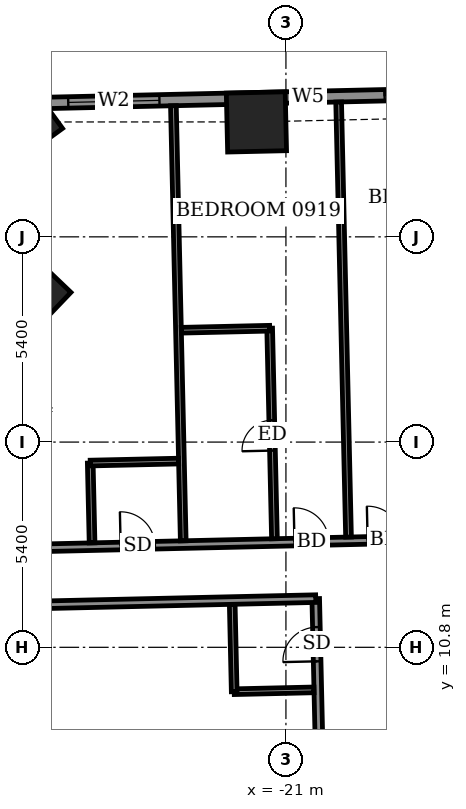
"""IFC4 building model, lengths in metres.
Left out: names, types, materials, properties, quantities, classifications, styles, units other than length and angle.
Written with IfcOpenShell. Run it as: python <this file> out.ifc"""

import sys

from ifc_helpers import new_model, si_unit, direction, frame, frame_2d, origin, origin_2d, place, context, subcontext, project, spatial, rectangle, extrude, element, fill, save


model = new_model("IFC4")
c1 = context("Model", 3, precision=1e-05, world=origin(), true_north=direction((0.0, 1.0)))
c2 = subcontext(c1, "Body", "Model", "MODEL_VIEW")
j1 = project(units=[si_unit("LENGTHUNIT", "METRE"), si_unit("PLANEANGLEUNIT", "RADIAN")], contexts=[c1])
p1 = place(None, origin())
s1 = spatial("IfcSite", under=j1, at=p1, CompositionType="ELEMENT")
p2 = place(p1, origin())
s2 = spatial("IfcBuilding", under=s1, at=p2, CompositionType="ELEMENT")
p3 = place(p2, frame((0.0, 0.0, 41.3)))
s3 = spatial("IfcBuildingStorey", under=s2, at=p3, CompositionType="ELEMENT", Elevation=41.3)
for number, where, z_axis, x_axis in (
    (1, (-21.776, 24.624, -0.55), (0.0, 0.0, 1.0), (-1.0, -0.023, 0.0)),
    (2, (-27.961, 24.623, -0.55), (0.0, 0.0, 1.0), (-0.808, -0.589, 0.0)),
    (3, (-27.753, 20.115, -0.55), (0.0, 0.0, 1.0), (-0.691, -0.723, 0.0)),
):
    element("IfcColumn", number, at=place(p3, frame(where, z_axis=z_axis, x_axis=x_axis)), inside=s3, PredefinedType="COLUMN", context=c2, shape_type="SweptSolid", body=[
        extrude(rectangle(XDim=1.55, YDim=1.55, at=origin_2d()), origin(), (0.0, 0.0, 1.0), 3.6),
    ])
p4 = place(p3, frame((24.423, 26.298, 0.0), z_axis=(0.0, 0.0, 1.0), x_axis=(-0.999742433108, -0.022695097355, 0.0)))
e4 = element("IfcWall", 4, at=p4, inside=s3, PredefinedType="SOLIDWALL", context=c2, shape_type="SweptSolid", body=[
    extrude(rectangle(XDim=52.701, YDim=0.3, at=frame_2d((26.35, 0.0))), origin(), (0.0, 0.0, 1.0), 3.05),
])
p5 = place(p4, frame((2.357, 0.0, 0.0)))
e5 = element("IfcOpeningElement", 5, at=p5, cuts=e4, PredefinedType="OPENING", context=c2, shape_type="SweptSolid", body=[
    extrude(rectangle(XDim=1.5, YDim=2.4, at=frame_2d((0.75, 1.2))), frame((0.0, 0.16, 0.0), z_axis=(0.0, -1.0, 0.0), x_axis=(1.0, 0.0, 0.0)), (0.0, 0.0, 1.0), 0.32),
])
p6 = place(p4, frame((7.475, 0.0, 0.0)))
e6 = element("IfcOpeningElement", 6, at=p6, cuts=e4, PredefinedType="OPENING", context=c2, shape_type="SweptSolid", body=[
    extrude(rectangle(XDim=1.5, YDim=2.4, at=frame_2d((0.75, 1.2))), frame((0.0, 0.16, 0.0), z_axis=(0.0, -1.0, 0.0), x_axis=(1.0, 0.0, 0.0)), (0.0, 0.0, 1.0), 0.32),
])
p7 = place(p4, frame((10.262, 0.0, 0.0)))
e7 = element("IfcOpeningElement", 7, at=p7, cuts=e4, PredefinedType="OPENING", context=c2, shape_type="SweptSolid", body=[
    extrude(rectangle(XDim=1.5, YDim=2.4, at=frame_2d((0.75, 1.2))), frame((0.0, 0.16, 0.0), z_axis=(0.0, -1.0, 0.0), x_axis=(1.0, 0.0, 0.0)), (0.0, 0.0, 1.0), 0.32),
])
p8 = place(p4, frame((15.1, 0.0, 0.0)))
e8 = element("IfcOpeningElement", 8, at=p8, cuts=e4, PredefinedType="OPENING", context=c2, shape_type="SweptSolid", body=[
    extrude(rectangle(XDim=1.5, YDim=2.4, at=frame_2d((0.75, 1.2))), frame((0.0, 0.16, 0.0), z_axis=(0.0, -1.0, 0.0), x_axis=(1.0, 0.0, 0.0)), (0.0, 0.0, 1.0), 0.32),
])
p9 = place(p4, frame((20.7, 0.0, 0.0)))
e9 = element("IfcOpeningElement", 9, at=p9, cuts=e4, PredefinedType="OPENING", context=c2, shape_type="SweptSolid", body=[
    extrude(rectangle(XDim=1.2, YDim=2.4, at=frame_2d((0.6, 1.2))), frame((0.0, 0.16, 0.0), z_axis=(0.0, -1.0, 0.0), x_axis=(1.0, 0.0, 0.0)), (0.0, 0.0, 1.0), 0.32),
])
p10 = place(p4, frame((23.337, 0.0, 0.0)))
e10 = element("IfcOpeningElement", 10, at=p10, cuts=e4, PredefinedType="OPENING", context=c2, shape_type="SweptSolid", body=[
    extrude(rectangle(XDim=1.5, YDim=2.4, at=frame_2d((0.75, 1.2))), frame((0.0, 0.16, 0.0), z_axis=(0.0, -1.0, 0.0), x_axis=(1.0, 0.0, 0.0)), (0.0, 0.0, 1.0), 0.32),
])
p11 = place(p4, frame((28.238, 0.0, 0.0)))
e11 = element("IfcOpeningElement", 11, at=p11, cuts=e4, PredefinedType="OPENING", context=c2, shape_type="SweptSolid", body=[
    extrude(rectangle(XDim=1.5, YDim=2.4, at=frame_2d((0.75, 1.2))), frame((0.0, 0.16, 0.0), z_axis=(0.0, -1.0, 0.0), x_axis=(1.0, 0.0, 0.0)), (0.0, 0.0, 1.0), 0.32),
])
p12 = place(p4, frame((33.9, 0.0, 0.0)))
e12 = element("IfcOpeningElement", 12, at=p12, cuts=e4, PredefinedType="OPENING", context=c2, shape_type="SweptSolid", body=[
    extrude(rectangle(XDim=1.2, YDim=2.4, at=frame_2d((0.6, 1.2))), frame((0.0, 0.16, 0.0), z_axis=(0.0, -1.0, 0.0), x_axis=(1.0, 0.0, 0.0)), (0.0, 0.0, 1.0), 0.32),
])
p13 = place(p4, frame((36.538, 0.0, 0.0)))
e13 = element("IfcOpeningElement", 13, at=p13, cuts=e4, PredefinedType="OPENING", context=c2, shape_type="SweptSolid", body=[
    extrude(rectangle(XDim=1.5, YDim=2.4, at=frame_2d((0.75, 1.2))), frame((0.0, 0.16, 0.0), z_axis=(0.0, -1.0, 0.0), x_axis=(1.0, 0.0, 0.0)), (0.0, 0.0, 1.0), 0.32),
])
p14 = place(p4, frame((41.338, 0.0, 0.0)))
e14 = element("IfcOpeningElement", 14, at=p14, cuts=e4, PredefinedType="OPENING", context=c2, shape_type="SweptSolid", body=[
    extrude(rectangle(XDim=1.5, YDim=2.4, at=frame_2d((0.75, 1.2))), frame((0.0, 0.16, 0.0), z_axis=(0.0, -1.0, 0.0), x_axis=(1.0, 0.0, 0.0)), (0.0, 0.0, 1.0), 0.32),
])
p15 = place(p4, frame((44.4, 0.0, 0.9)))
e15 = element("IfcOpeningElement", 15, at=p15, cuts=e4, PredefinedType="OPENING", context=c2, shape_type="SweptSolid", body=[
    extrude(rectangle(XDim=0.9, YDim=1.5, at=frame_2d((0.45, 0.75))), frame((0.0, 0.16, 0.0), z_axis=(0.0, -1.0, 0.0), x_axis=(1.0, 0.0, 0.0)), (0.0, 0.0, 1.0), 0.32),
])
p16 = place(p4, frame((48.764, 0.0, 0.9)))
e16 = element("IfcOpeningElement", 16, at=p16, cuts=e4, PredefinedType="OPENING", context=c2, shape_type="SweptSolid", body=[
    extrude(rectangle(XDim=2.4, YDim=1.5, at=frame_2d((1.2, 0.75))), frame((0.0, 0.16, 0.0), z_axis=(0.0, -1.0, 0.0), x_axis=(1.0, 0.0, 0.0)), (0.0, 0.0, 1.0), 0.32),
])
p17 = place(p3, frame((-22.248, 26.688, 0.0), z_axis=(0.0, 0.0, 1.0), x_axis=(0.999743178102, 0.022662255828, 0.0)))
e17 = element("IfcWall", 17, at=p17, inside=s3, PredefinedType="USERDEFINED", context=c2, shape_type="SweptSolid", body=[
    extrude(rectangle(XDim=6.0, YDim=0.55, at=frame_2d((3.0, 0.0))), origin(), (0.0, 0.0, 1.0), 0.8),
])
p18 = place(p3, frame((-19.589, -15.562, 0.0), z_axis=(0.0, 0.0, 1.0), x_axis=(-0.02267447203, 0.999742901109, 0.0)))
e18 = element("IfcWall", 18, at=p18, inside=s3, PredefinedType="PARTITIONING", context=c2, shape_type="SweptSolid", body=[
    extrude(rectangle(XDim=27.65, YDim=0.2, at=frame_2d((13.825, 0.0))), origin(), (0.0, 0.0, 1.0), 3.05),
])
p19 = place(p18, frame((22.313, 0.0, 0.0)))
e19 = element("IfcOpeningElement", 19, at=p19, cuts=e18, PredefinedType="OPENING", context=c2, shape_type="SweptSolid", body=[
    extrude(rectangle(XDim=1.0, YDim=2.1, at=frame_2d((0.5, 1.05))), frame((0.0, 0.11, 0.0), z_axis=(0.0, -1.0, 0.0), x_axis=(1.0, 0.0, 0.0)), (0.0, 0.0, 1.0), 0.22),
])
p20 = place(p18, frame((26.0, 0.0, 0.0)))
e20 = element("IfcOpeningElement", 20, at=p20, cuts=e18, PredefinedType="OPENING", context=c2, shape_type="SweptSolid", body=[
    extrude(rectangle(XDim=0.9, YDim=2.1, at=frame_2d((0.45, 1.05))), frame((0.0, 0.11, 0.0), z_axis=(0.0, -1.0, 0.0), x_axis=(1.0, 0.0, 0.0)), (0.0, 0.0, 1.0), 0.22),
])
p21 = place(p18, frame((17.843, 0.0, 0.0)))
e21 = element("IfcOpeningElement", 21, at=p21, cuts=e18, PredefinedType="OPENING", context=c2, shape_type="SweptSolid", body=[
    extrude(rectangle(XDim=1.0, YDim=2.1, at=frame_2d((0.5, 1.05))), frame((0.0, 0.11, 0.0), z_axis=(0.0, -1.0, 0.0), x_axis=(1.0, 0.0, 0.0)), (0.0, 0.0, 1.0), 0.22),
])
p22 = place(p18, frame((13.592, 0.0, 0.0)))
e22 = element("IfcOpeningElement", 22, at=p22, cuts=e18, PredefinedType="OPENING", context=c2, shape_type="SweptSolid", body=[
    extrude(rectangle(XDim=1.0, YDim=2.1, at=frame_2d((0.5, 1.05))), frame((0.0, 0.11, 0.0), z_axis=(0.0, -1.0, 0.0), x_axis=(1.0, 0.0, 0.0)), (0.0, 0.0, 1.0), 0.22),
])
p23 = place(p18, frame((10.0, 0.0, 0.0)))
e23 = element("IfcOpeningElement", 23, at=p23, cuts=e18, PredefinedType="OPENING", context=c2, shape_type="SweptSolid", body=[
    extrude(rectangle(XDim=1.0, YDim=2.1, at=frame_2d((0.5, 1.05))), frame((0.0, 0.11, 0.0), z_axis=(0.0, -1.0, 0.0), x_axis=(1.0, 0.0, 0.0)), (0.0, 0.0, 1.0), 0.22),
])
p24 = place(p18, frame((7.475, 0.0, 0.0)))
e24 = element("IfcOpeningElement", 24, at=p24, cuts=e18, PredefinedType="OPENING", context=c2, shape_type="SweptSolid", body=[
    extrude(rectangle(XDim=0.9, YDim=2.1, at=frame_2d((0.45, 1.05))), frame((0.0, 0.11, 0.0), z_axis=(0.0, -1.0, 0.0), x_axis=(1.0, 0.0, 0.0)), (0.0, 0.0, 1.0), 0.22),
])
p25 = place(p18, frame((4.613, 0.0, 0.0)))
e25 = element("IfcOpeningElement", 25, at=p25, cuts=e18, PredefinedType="OPENING", context=c2, shape_type="SweptSolid", body=[
    extrude(rectangle(XDim=1.0, YDim=2.1, at=frame_2d((0.5, 1.05))), frame((0.0, 0.11, 0.0), z_axis=(0.0, -1.0, 0.0), x_axis=(1.0, 0.0, 0.0)), (0.0, 0.0, 1.0), 0.22),
])
p26 = place(p3, frame((-22.361, 9.632, 0.0), z_axis=(0.0, 0.0, 1.0), x_axis=(0.999740272436, 0.02279007832, 0.0)))
e26 = element("IfcWall", 26, at=p26, inside=s3, PredefinedType="PARTITIONING", context=c2, shape_type="SweptSolid", body=[
    extrude(rectangle(XDim=2.1, YDim=0.15, at=frame_2d((1.05, 0.0))), origin(), (0.0, 0.0, 1.0), 3.05),
])
p27 = place(p3, frame((-22.361, 9.632, 0.0), z_axis=(0.0, 0.0, 1.0), x_axis=(-0.022615284993, 0.999744241736, 0.0)))
e27 = element("IfcWall", 27, at=p27, inside=s3, PredefinedType="PARTITIONING", context=c2, shape_type="SweptSolid", body=[
    extrude(rectangle(XDim=2.299, YDim=0.15, at=frame_2d((1.15, 0.0))), origin(), (0.0, 0.0, 1.0), 3.05),
])
p28 = place(p3, frame((-31.313, 11.829, 0.0), z_axis=(0.0, 0.0, 1.0), x_axis=(0.999742346277, 0.022698921993, 0.0)))
e28 = element("IfcWall", 28, at=p28, inside=s3, PredefinedType="PARTITIONING", context=c2, shape_type="SweptSolid", body=[
    extrude(rectangle(XDim=11.1, YDim=0.2, at=frame_2d((5.55, 0.0))), origin(), (0.0, 0.0, 1.0), 3.05),
])
p29 = place(p3, frame((-31.347, 13.329, 0.0), z_axis=(0.0, 0.0, 1.0), x_axis=(0.999742613079, 0.022687168058, 0.0)))
e29 = element("IfcWall", 29, at=p29, inside=s3, PredefinedType="PARTITIONING", context=c2, shape_type="SweptSolid", body=[
    extrude(rectangle(XDim=58.799, YDim=0.2, at=frame_2d((29.399, 0.0))), origin(), (0.0, 0.0, 1.0), 3.05),
])
p30 = place(p29, frame((56.45, 0.0, 0.0)))
e30 = element("IfcOpeningElement", 30, at=p30, cuts=e29, PredefinedType="OPENING", context=c2, shape_type="SweptSolid", body=[
    extrude(rectangle(XDim=1.0, YDim=2.1, at=frame_2d((0.5, 1.05))), frame((0.0, 0.11, 0.0), z_axis=(0.0, -1.0, 0.0), x_axis=(1.0, 0.0, 0.0)), (0.0, 0.0, 1.0), 0.22),
])
p31 = place(p29, frame((51.85, 0.0, 0.0)))
e31 = element("IfcOpeningElement", 31, at=p31, cuts=e29, PredefinedType="OPENING", context=c2, shape_type="SweptSolid", body=[
    extrude(rectangle(XDim=0.9, YDim=2.1, at=frame_2d((0.45, 1.05))), frame((0.0, 0.11, 0.0), z_axis=(0.0, -1.0, 0.0), x_axis=(1.0, 0.0, 0.0)), (0.0, 0.0, 1.0), 0.22),
])
p32 = place(p29, frame((47.1, 0.0, 0.0)))
e32 = element("IfcOpeningElement", 32, at=p32, cuts=e29, PredefinedType="OPENING", context=c2, shape_type="SweptSolid", body=[
    extrude(rectangle(XDim=0.9, YDim=2.1, at=frame_2d((0.45, 1.05))), frame((0.0, 0.11, 0.0), z_axis=(0.0, -1.0, 0.0), x_axis=(1.0, 0.0, 0.0)), (0.0, 0.0, 1.0), 0.22),
])
p33 = place(p29, frame((45.225, 0.0, 0.0)))
e33 = element("IfcOpeningElement", 33, at=p33, cuts=e29, PredefinedType="OPENING", context=c2, shape_type="SweptSolid", body=[
    extrude(rectangle(XDim=0.9, YDim=2.1, at=frame_2d((0.45, 1.05))), frame((0.0, 0.11, 0.0), z_axis=(0.0, -1.0, 0.0), x_axis=(1.0, 0.0, 0.0)), (0.0, 0.0, 1.0), 0.22),
])
p34 = place(p29, frame((38.55, 0.0, 0.0)))
e34 = element("IfcOpeningElement", 34, at=p34, cuts=e29, PredefinedType="OPENING", context=c2, shape_type="SweptSolid", body=[
    extrude(rectangle(XDim=0.9, YDim=2.1, at=frame_2d((0.45, 1.05))), frame((0.0, 0.11, 0.0), z_axis=(0.0, -1.0, 0.0), x_axis=(1.0, 0.0, 0.0)), (0.0, 0.0, 1.0), 0.22),
])
p35 = place(p29, frame((36.625, 0.0, 0.0)))
e35 = element("IfcOpeningElement", 35, at=p35, cuts=e29, PredefinedType="OPENING", context=c2, shape_type="SweptSolid", body=[
    extrude(rectangle(XDim=0.9, YDim=2.1, at=frame_2d((0.45, 1.05))), frame((0.0, 0.11, 0.0), z_axis=(0.0, -1.0, 0.0), x_axis=(1.0, 0.0, 0.0)), (0.0, 0.0, 1.0), 0.22),
])
p36 = place(p29, frame((29.875, 0.0, 0.0)))
e36 = element("IfcOpeningElement", 36, at=p36, cuts=e29, PredefinedType="OPENING", context=c2, shape_type="SweptSolid", body=[
    extrude(rectangle(XDim=0.9, YDim=2.1, at=frame_2d((0.45, 1.05))), frame((0.0, 0.11, 0.0), z_axis=(0.0, -1.0, 0.0), x_axis=(1.0, 0.0, 0.0)), (0.0, 0.0, 1.0), 0.22),
])
p37 = place(p29, frame((27.9, 0.0, 0.0)))
e37 = element("IfcOpeningElement", 37, at=p37, cuts=e29, PredefinedType="OPENING", context=c2, shape_type="SweptSolid", body=[
    extrude(rectangle(XDim=0.9, YDim=2.1, at=frame_2d((0.45, 1.05))), frame((0.0, 0.11, 0.0), z_axis=(0.0, -1.0, 0.0), x_axis=(1.0, 0.0, 0.0)), (0.0, 0.0, 1.0), 0.22),
])
p38 = place(p29, frame((21.1, 0.0, 0.0)))
e38 = element("IfcOpeningElement", 38, at=p38, cuts=e29, PredefinedType="OPENING", context=c2, shape_type="SweptSolid", body=[
    extrude(rectangle(XDim=0.9, YDim=2.1, at=frame_2d((0.45, 1.05))), frame((0.0, 0.11, 0.0), z_axis=(0.0, -1.0, 0.0), x_axis=(1.0, 0.0, 0.0)), (0.0, 0.0, 1.0), 0.22),
])
p39 = place(p29, frame((19.175, 0.0, 0.0)))
e39 = element("IfcOpeningElement", 39, at=p39, cuts=e29, PredefinedType="OPENING", context=c2, shape_type="SweptSolid", body=[
    extrude(rectangle(XDim=0.9, YDim=2.1, at=frame_2d((0.45, 1.05))), frame((0.0, 0.11, 0.0), z_axis=(0.0, -1.0, 0.0), x_axis=(1.0, 0.0, 0.0)), (0.0, 0.0, 1.0), 0.22),
])
p40 = place(p29, frame((12.5, 0.0, 0.0)))
e40 = element("IfcOpeningElement", 40, at=p40, cuts=e29, PredefinedType="OPENING", context=c2, shape_type="SweptSolid", body=[
    extrude(rectangle(XDim=0.9, YDim=2.1, at=frame_2d((0.45, 1.05))), frame((0.0, 0.11, 0.0), z_axis=(0.0, -1.0, 0.0), x_axis=(1.0, 0.0, 0.0)), (0.0, 0.0, 1.0), 0.22),
])
p41 = place(p29, frame((10.575, 0.0, 0.0)))
e41 = element("IfcOpeningElement", 41, at=p41, cuts=e29, PredefinedType="OPENING", context=c2, shape_type="SweptSolid", body=[
    extrude(rectangle(XDim=0.9, YDim=2.1, at=frame_2d((0.45, 1.05))), frame((0.0, 0.11, 0.0), z_axis=(0.0, -1.0, 0.0), x_axis=(1.0, 0.0, 0.0)), (0.0, 0.0, 1.0), 0.22),
])
p42 = place(p29, frame((1.425, 0.0, 0.0)))
e42 = element("IfcOpeningElement", 42, at=p42, cuts=e29, PredefinedType="OPENING", context=c2, shape_type="SweptSolid", body=[
    extrude(rectangle(XDim=1.0, YDim=2.1, at=frame_2d((0.5, 1.05))), frame((0.0, 0.11, 0.0), z_axis=(0.0, -1.0, 0.0), x_axis=(1.0, 0.0, 0.0)), (0.0, 0.0, 1.0), 0.22),
])
p43 = place(p29, frame((6.0, 0.0, 0.0)))
e43 = element("IfcOpeningElement", 43, at=p43, cuts=e29, PredefinedType="OPENING", context=c2, shape_type="SweptSolid", body=[
    extrude(rectangle(XDim=0.9, YDim=2.1, at=frame_2d((0.45, 1.05))), frame((0.0, 0.11, 0.0), z_axis=(0.0, -1.0, 0.0), x_axis=(1.0, 0.0, 0.0)), (0.0, 0.0, 1.0), 0.22),
])
p44 = place(p3, frame((-26.101, 13.548, 0.0), z_axis=(0.0, 0.0, 1.0), x_axis=(-0.022782133344, 0.999740453518, 0.0)))
e44 = element("IfcWall", 44, at=p44, inside=s3, PredefinedType="PARTITIONING", context=c2, shape_type="SweptSolid", body=[
    extrude(rectangle(XDim=2.1, YDim=0.15, at=frame_2d((1.05, 0.0))), origin(), (0.0, 0.0, 1.0), 3.05),
])
p45 = place(p3, frame((-23.702, 13.602, 0.0), z_axis=(0.0, 0.0, 1.0), x_axis=(-0.022621153305, 0.999744108971, 0.0)))
e45 = element("IfcWall", 45, at=p45, inside=s3, PredefinedType="PARTITIONING", context=c2, shape_type="SweptSolid", body=[
    extrude(rectangle(XDim=11.451, YDim=0.15, at=frame_2d((5.726, 0.0))), origin(), (0.0, 0.0, 1.0), 2.55),
])
p46 = place(p3, frame((-21.302, 13.657, 0.0), z_axis=(0.0, 0.0, 1.0), x_axis=(-0.02273742063, 0.999741471433, 0.0)))
e46 = element("IfcWall", 46, at=p46, inside=s3, PredefinedType="PARTITIONING", context=c2, shape_type="SweptSolid", body=[
    extrude(rectangle(XDim=5.541, YDim=0.15, at=frame_2d((2.77, 0.0))), origin(), (0.0, 0.0, 1.0), 3.05),
])
p47 = place(p46, frame((2.32, 0.0, 0.0)))
e47 = element("IfcOpeningElement", 47, at=p47, cuts=e46, PredefinedType="OPENING", context=c2, shape_type="SweptSolid", body=[
    extrude(rectangle(XDim=0.8, YDim=2.1, at=frame_2d((0.4, 1.05))), frame((0.0, 0.085, 0.0), z_axis=(0.0, -1.0, 0.0), x_axis=(1.0, 0.0, 0.0)), (0.0, 0.0, 1.0), 0.17),
])
p48 = place(p3, frame((-19.353, 13.701, 0.0), z_axis=(0.0, 0.0, 1.0), x_axis=(-0.022708327922, 0.999742132674, 0.0)))
e48 = element("IfcWall", 48, at=p48, inside=s3, PredefinedType="PARTITIONING", context=c2, shape_type="SweptSolid", body=[
    extrude(rectangle(XDim=11.45, YDim=0.15, at=frame_2d((5.725, 0.0))), origin(), (0.0, 0.0, 1.0), 2.55),
])
p49 = place(p3, frame((-26.149, 15.648, 0.0), z_axis=(0.0, 0.0, 1.0), x_axis=(0.999749954681, 0.022361308448, 0.0)))
e49 = element("IfcWall", 49, at=p49, inside=s3, PredefinedType="PARTITIONING", context=c2, shape_type="SweptSolid", body=[
    extrude(rectangle(XDim=2.325, YDim=0.15, at=frame_2d((1.163, 0.0))), origin(), (0.0, 0.0, 1.0), 3.05),
])
p50 = place(p3, frame((-23.752, 19.143, 0.0), z_axis=(0.0, 0.0, 1.0), x_axis=(0.999740260747, 0.02279059109, 0.0)))
e50 = element("IfcWall", 50, at=p50, inside=s3, PredefinedType="PARTITIONING", context=c2, shape_type="SweptSolid", body=[
    extrude(rectangle(XDim=2.324, YDim=0.15, at=frame_2d((1.162, 0.0))), origin(), (0.0, 0.0, 1.0), 3.05),
])
p51 = place(p14, origin())
e51 = element("IfcDoor", 51, at=p51, inside=s3, OperationType="SLIDING_TO_LEFT", PredefinedType="DOOR", context=c2, shape_type="SweptSolid", body=[
    extrude(rectangle(XDim=1.5, YDim=2.4, at=frame_2d((0.75, 1.2))), frame((0.0, 0.025, 0.0), z_axis=(0.0, -1.0, 0.0), x_axis=(1.0, 0.0, 0.0)), (0.0, 0.0, 1.0), 0.05),
])
fill(e14, e51)
p52 = place(p15, origin())
e52 = element("IfcWindow", 52, at=p52, inside=s3, PartitioningType="SINGLE_PANEL", PredefinedType="WINDOW", context=c2, shape_type="SweptSolid", body=[
    extrude(rectangle(XDim=0.9, YDim=1.5, at=frame_2d((0.45, 0.75))), frame((0.0, 0.03, 0.0), z_axis=(0.0, -1.0, 0.0), x_axis=(1.0, 0.0, 0.0)), (0.0, 0.0, 1.0), 0.06),
])
fill(e15, e52)
p53 = place(p16, origin())
e53 = element("IfcWindow", 53, at=p53, inside=s3, PartitioningType="DOUBLE_PANEL_VERTICAL", PredefinedType="WINDOW", context=c2, shape_type="SweptSolid", body=[
    extrude(rectangle(XDim=2.4, YDim=1.5, at=frame_2d((1.2, 0.75))), frame((0.0, 0.03, 0.0), z_axis=(0.0, -1.0, 0.0), x_axis=(1.0, 0.0, 0.0)), (0.0, 0.0, 1.0), 0.06),
])
fill(e16, e53)
p54 = place(p40, origin())
e54 = element("IfcDoor", 54, at=p54, inside=s3, OperationType="SINGLE_SWING_RIGHT", PredefinedType="DOOR", context=c2, shape_type="SweptSolid", body=[
    extrude(rectangle(XDim=0.9, YDim=2.1, at=frame_2d((0.45, 1.05))), frame((0.0, 0.025, 0.0), z_axis=(0.0, -1.0, 0.0), x_axis=(1.0, 0.0, 0.0)), (0.0, 0.0, 1.0), 0.05),
])
fill(e40, e54)
p55 = place(p41, origin())
e55 = element("IfcDoor", 55, at=p55, inside=s3, OperationType="SINGLE_SWING_LEFT", PredefinedType="DOOR", context=c2, shape_type="SweptSolid", body=[
    extrude(rectangle(XDim=0.9, YDim=2.1, at=frame_2d((0.45, 1.05))), frame((0.0, 0.025, 0.0), z_axis=(0.0, -1.0, 0.0), x_axis=(1.0, 0.0, 0.0)), (0.0, 0.0, 1.0), 0.05),
])
fill(e41, e55)
p56 = place(p47, origin())
e56 = element("IfcDoor", 56, at=p56, inside=s3, OperationType="SINGLE_SWING_LEFT", PredefinedType="DOOR", context=c2, shape_type="SweptSolid", body=[
    extrude(rectangle(XDim=0.8, YDim=2.1, at=frame_2d((0.4, 1.05))), frame((0.0, 0.025, 0.0), z_axis=(0.0, -1.0, 0.0), x_axis=(1.0, 0.0, 0.0)), (0.0, 0.0, 1.0), 0.05),
])
fill(e47, e56)
p57 = place(p43, origin())
e57 = element("IfcDoor", 57, at=p57, inside=s3, OperationType="SINGLE_SWING_LEFT", PredefinedType="DOOR", context=c2, shape_type="SweptSolid", body=[
    extrude(rectangle(XDim=0.9, YDim=2.1, at=frame_2d((0.45, 1.05))), frame((0.0, 0.025, 0.0), z_axis=(0.0, -1.0, 0.0), x_axis=(1.0, 0.0, 0.0)), (0.0, 0.0, 1.0), 0.05),
])
fill(e43, e57)
p58 = place(p20, origin())
e58 = element("IfcDoor", 58, at=p58, inside=s3, OperationType="SINGLE_SWING_RIGHT", PredefinedType="DOOR", context=c2, shape_type="SweptSolid", body=[
    extrude(rectangle(XDim=0.9, YDim=2.1, at=frame_2d((0.45, 1.05))), frame((0.0, 0.025, 0.0), z_axis=(0.0, -1.0, 0.0), x_axis=(1.0, 0.0, 0.0)), (0.0, 0.0, 1.0), 0.05),
])
fill(e20, e58)
save(model, sys.argv[1])
